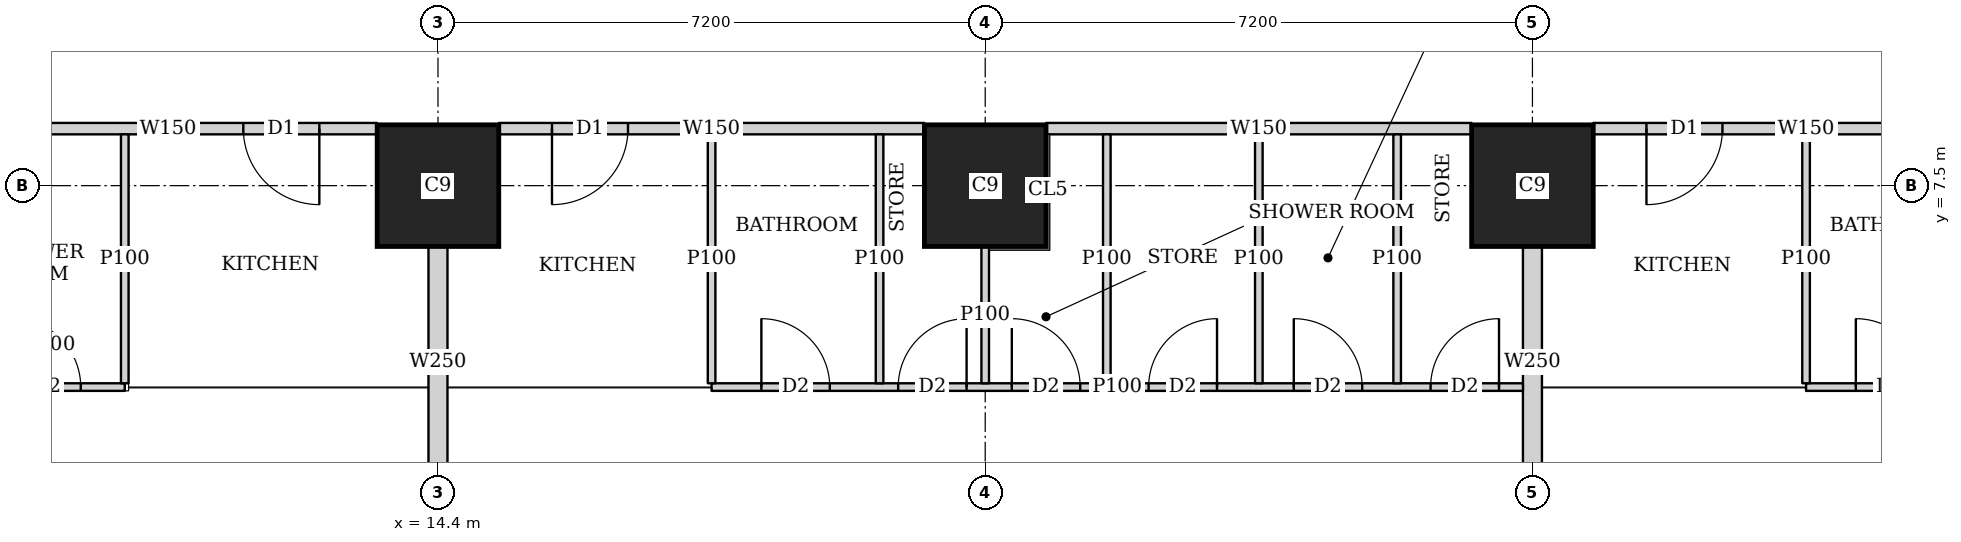
"""IFC4 building model, lengths in metres.
Left out: names, types, materials, properties, quantities, classifications, styles, units other than length and angle.
Written with IfcOpenShell. Run it as: python <this file> out.ifc"""

import sys

from ifc_helpers import new_model, si_unit, direction, frame, frame_2d, origin, origin_2d, place, context, subcontext, project, spatial, rectangle, extrude, element, fill, save


model = new_model("IFC4")
c1 = context("Model", 3, precision=1e-05, world=origin(), true_north=direction((0.0, 1.0)))
c2 = subcontext(c1, "Body", "Model", "MODEL_VIEW")
j1 = project(units=[si_unit("LENGTHUNIT", "METRE"), si_unit("PLANEANGLEUNIT", "RADIAN")], contexts=[c1])
p1 = place(None, origin())
s1 = spatial("IfcSite", under=j1, at=p1, CompositionType="ELEMENT")
p2 = place(p1, origin())
s2 = spatial("IfcBuilding", under=s1, at=p2, CompositionType="ELEMENT")
p3 = place(p2, frame((0.0, 0.0, 81.65)))
s3 = spatial("IfcBuildingStorey", under=s2, at=p3, CompositionType="ELEMENT", Elevation=81.65)
for number, where, z_axis, x_axis in (
    (1, (14.4, 7.5, 0.0), (0.0, 0.0, 1.0), (1.0, 0.0, 0.0)),
    (2, (21.6, 7.5, 0.0), (0.0, 0.0, 1.0), (1.0, 0.0, 0.0)),
    (3, (28.8, 7.5, 0.0), (0.0, 0.0, 1.0), (1.0, 0.0, 0.0)),
):
    element("IfcColumn", number, at=place(p3, frame(where, z_axis=z_axis, x_axis=x_axis)), inside=s3, PredefinedType="COLUMN", context=c2, shape_type="SweptSolid", body=[
        extrude(rectangle(XDim=1.6, YDim=1.6, at=origin_2d()), origin(), (0.0, 0.0, 1.0), 3.75),
    ])
p4 = place(p3, frame((35.199, 8.25, 0.0), z_axis=(0.0, 0.0, 1.0), x_axis=(-1.0, 0.0, 0.0)))
e4 = element("IfcWall", 4, at=p4, inside=s3, PredefinedType="SOLIDWALL", context=c2, shape_type="SweptSolid", body=[
    extrude(rectangle(XDim=5.598, YDim=0.15, at=frame_2d((2.799, 0.0))), origin(), (0.0, 0.0, 1.0), 3.5),
])
p5 = place(p4, frame((3.899, 0.0, 0.0)))
e5 = element("IfcOpeningElement", 5, at=p5, cuts=e4, PredefinedType="OPENING", context=c2, shape_type="SweptSolid", body=[
    extrude(rectangle(XDim=1.0, YDim=2.1, at=frame_2d((0.5, 1.05))), frame((0.0, 0.085, 0.0), z_axis=(0.0, -1.0, 0.0), x_axis=(1.0, 0.0, 0.0)), (0.0, 0.0, 1.0), 0.17),
])
p6 = place(p3, frame((27.999, 8.25, 0.0), z_axis=(0.0, 0.0, 1.0), x_axis=(-1.0, 0.0, 0.0)))
e6 = element("IfcWall", 6, at=p6, inside=s3, PredefinedType="SOLIDWALL", context=c2, shape_type="SweptSolid", body=[
    extrude(rectangle(XDim=5.598, YDim=0.15, at=frame_2d((2.799, 0.0))), origin(), (0.0, 0.0, 1.0), 3.5),
])
p7 = place(p3, frame((20.799, 8.25, 0.0), z_axis=(0.0, 0.0, 1.0), x_axis=(-1.0, 0.0, 0.0)))
e7 = element("IfcWall", 7, at=p7, inside=s3, PredefinedType="SOLIDWALL", context=c2, shape_type="SweptSolid", body=[
    extrude(rectangle(XDim=5.598, YDim=0.15, at=frame_2d((2.799, 0.0))), origin(), (0.0, 0.0, 1.0), 3.5),
])
p8 = place(p7, frame((3.899, 0.0, 0.0)))
e8 = element("IfcOpeningElement", 8, at=p8, cuts=e7, PredefinedType="OPENING", context=c2, shape_type="SweptSolid", body=[
    extrude(rectangle(XDim=1.0, YDim=2.1, at=frame_2d((0.5, 1.05))), frame((0.0, 0.085, 0.0), z_axis=(0.0, -1.0, 0.0), x_axis=(1.0, 0.0, 0.0)), (0.0, 0.0, 1.0), 0.17),
])
p9 = place(p3, frame((13.599, 8.25, 0.0), z_axis=(0.0, 0.0, 1.0), x_axis=(-1.0, 0.0, 0.0)))
e9 = element("IfcWall", 9, at=p9, inside=s3, PredefinedType="SOLIDWALL", context=c2, shape_type="SweptSolid", body=[
    extrude(rectangle(XDim=5.499, YDim=0.15, at=frame_2d((2.75, 0.0))), origin(), (0.0, 0.0, 1.0), 3.5),
])
p10 = place(p9, frame((0.76, 0.0, 0.0)))
e10 = element("IfcOpeningElement", 10, at=p10, cuts=e9, PredefinedType="OPENING", context=c2, shape_type="SweptSolid", body=[
    extrude(rectangle(XDim=1.0, YDim=2.1, at=frame_2d((0.5, 1.05))), frame((0.0, 0.085, 0.0), z_axis=(0.0, -1.0, 0.0), x_axis=(1.0, 0.0, 0.0)), (0.0, 0.0, 1.0), 0.17),
])
p11 = place(p3, frame((33.382, 45.65, 0.0), z_axis=(0.0, 0.0, 1.0), x_axis=(0.185593544777, -0.982626600565, 0.0)))
e11 = element("IfcWall", 11, at=p11, inside=s3, PredefinedType="SOLIDWALL", context=c2, shape_type="SweptSolid", body=[
    extrude(rectangle(XDim=47.118, YDim=0.15, at=frame_2d((23.559, 0.0))), origin(), (0.0, 0.0, 1.0), 2.2),
])
p12 = place(p11, frame((19.054, 0.0, 0.0)))
e12 = element("IfcOpeningElement", 12, at=p12, cuts=e11, PredefinedType="OPENING", context=c2, shape_type="SweptSolid", body=[
    extrude(rectangle(XDim=1.0, YDim=2.1, at=frame_2d((0.5, 1.05))), frame((0.0, 0.085, 0.0), z_axis=(0.0, -1.0, 0.0), x_axis=(1.0, 0.0, 0.0)), (0.0, 0.0, 1.0), 0.17),
])
p13 = place(p11, frame((22.87, 0.0, 0.0)))
e13 = element("IfcOpeningElement", 13, at=p13, cuts=e11, PredefinedType="OPENING", context=c2, shape_type="SweptSolid", body=[
    extrude(rectangle(XDim=1.0, YDim=2.1, at=frame_2d((0.5, 1.05))), frame((0.0, 0.085, 0.0), z_axis=(0.0, -1.0, 0.0), x_axis=(1.0, 0.0, 0.0)), (0.0, 0.0, 1.0), 0.17),
])
p14 = place(p11, frame((33.833, 0.0, 0.0)))
e14 = element("IfcOpeningElement", 14, at=p14, cuts=e11, PredefinedType="OPENING", context=c2, shape_type="SweptSolid", body=[
    extrude(rectangle(XDim=1.0, YDim=2.1, at=frame_2d((0.5, 1.05))), frame((0.0, 0.085, 0.0), z_axis=(0.0, -1.0, 0.0), x_axis=(1.0, 0.0, 0.0)), (0.0, 0.0, 1.0), 0.17),
])
p15 = place(p3, frame((10.279, 4.85, 0.0), z_axis=(0.0, 0.0, 1.0), x_axis=(-1.0, 0.0, 0.0)))
e15 = element("IfcWall", 15, at=p15, inside=s3, PredefinedType="PARTITIONING", context=c2, shape_type="SweptSolid", body=[
    extrude(rectangle(XDim=1.954, YDim=0.1, at=frame_2d((0.977, 0.0))), origin(), (0.0, 0.0, 1.0), 3.5),
])
p16 = place(p15, frame((0.579, 0.0, 0.0)))
e16 = element("IfcOpeningElement", 16, at=p16, cuts=e15, PredefinedType="OPENING", context=c2, shape_type="SweptSolid", body=[
    extrude(rectangle(XDim=0.9, YDim=2.1, at=frame_2d((0.45, 1.05))), frame((0.0, 0.06, 0.0), z_axis=(0.0, -1.0, 0.0), x_axis=(1.0, 0.0, 0.0)), (0.0, 0.0, 1.0), 0.12),
])
p17 = place(p3, frame((10.279, 4.9, 0.0), z_axis=(0.0, 0.0, 1.0), x_axis=(0.0, 1.0, 0.0)))
e17 = element("IfcWall", 17, at=p17, inside=s3, PredefinedType="PARTITIONING", context=c2, shape_type="SweptSolid", body=[
    extrude(rectangle(XDim=3.275, YDim=0.1, at=frame_2d((1.638, 0.0))), origin(), (0.0, 0.0, 1.0), 3.5),
])
p18 = place(p3, frame((28.675, 4.85, 0.0), z_axis=(0.0, 0.0, 1.0), x_axis=(-1.0, 0.0, 0.0)))
e18 = element("IfcWall", 18, at=p18, inside=s3, PredefinedType="PARTITIONING", context=c2, shape_type="SweptSolid", body=[
    extrude(rectangle(XDim=10.675, YDim=0.1, at=frame_2d((5.337, 0.0))), origin(), (0.0, 0.0, 1.0), 3.5),
])
p19 = place(p18, frame((9.12, 0.0, 0.0)))
e19 = element("IfcOpeningElement", 19, at=p19, cuts=e18, PredefinedType="OPENING", context=c2, shape_type="SweptSolid", body=[
    extrude(rectangle(XDim=0.9, YDim=2.1, at=frame_2d((0.45, 1.05))), frame((0.0, 0.06, 0.0), z_axis=(0.0, -1.0, 0.0), x_axis=(1.0, 0.0, 0.0)), (0.0, 0.0, 1.0), 0.12),
])
p20 = place(p18, frame((5.825, 0.0, 0.0)))
e20 = element("IfcOpeningElement", 20, at=p20, cuts=e18, PredefinedType="OPENING", context=c2, shape_type="SweptSolid", body=[
    extrude(rectangle(XDim=0.9, YDim=2.1, at=frame_2d((0.45, 1.05))), frame((0.0, 0.06, 0.0), z_axis=(0.0, -1.0, 0.0), x_axis=(1.0, 0.0, 0.0)), (0.0, 0.0, 1.0), 0.12),
])
p21 = place(p18, frame((2.115, 0.0, 0.0)))
e21 = element("IfcOpeningElement", 21, at=p21, cuts=e18, PredefinedType="OPENING", context=c2, shape_type="SweptSolid", body=[
    extrude(rectangle(XDim=0.9, YDim=2.1, at=frame_2d((0.45, 1.05))), frame((0.0, 0.06, 0.0), z_axis=(0.0, -1.0, 0.0), x_axis=(1.0, 0.0, 0.0)), (0.0, 0.0, 1.0), 0.12),
])
p22 = place(p18, frame((7.32, 0.0, 0.0)))
e22 = element("IfcOpeningElement", 22, at=p22, cuts=e18, PredefinedType="OPENING", context=c2, shape_type="SweptSolid", body=[
    extrude(rectangle(XDim=0.9, YDim=2.1, at=frame_2d((0.45, 1.05))), frame((0.0, 0.06, 0.0), z_axis=(0.0, -1.0, 0.0), x_axis=(1.0, 0.0, 0.0)), (0.0, 0.0, 1.0), 0.12),
])
p23 = place(p18, frame((4.025, 0.0, 0.0)))
e23 = element("IfcOpeningElement", 23, at=p23, cuts=e18, PredefinedType="OPENING", context=c2, shape_type="SweptSolid", body=[
    extrude(rectangle(XDim=0.9, YDim=2.1, at=frame_2d((0.45, 1.05))), frame((0.0, 0.06, 0.0), z_axis=(0.0, -1.0, 0.0), x_axis=(1.0, 0.0, 0.0)), (0.0, 0.0, 1.0), 0.12),
])
p24 = place(p18, frame((0.315, 0.0, 0.0)))
e24 = element("IfcOpeningElement", 24, at=p24, cuts=e18, PredefinedType="OPENING", context=c2, shape_type="SweptSolid", body=[
    extrude(rectangle(XDim=0.9, YDim=2.1, at=frame_2d((0.45, 1.05))), frame((0.0, 0.06, 0.0), z_axis=(0.0, -1.0, 0.0), x_axis=(1.0, 0.0, 0.0)), (0.0, 0.0, 1.0), 0.12),
])
p25 = place(p3, frame((18.0, 4.9, 0.0), z_axis=(0.0, 0.0, 1.0), x_axis=(0.0, 1.0, 0.0)))
e25 = element("IfcWall", 25, at=p25, inside=s3, PredefinedType="PARTITIONING", context=c2, shape_type="SweptSolid", body=[
    extrude(rectangle(XDim=3.275, YDim=0.1, at=frame_2d((1.638, 0.0))), origin(), (0.0, 0.0, 1.0), 3.5),
])
p26 = place(p3, frame((21.6, 4.9, 0.0), z_axis=(0.0, 0.0, 1.0), x_axis=(0.0, 1.0, 0.0)))
e26 = element("IfcWall", 26, at=p26, inside=s3, PredefinedType="PARTITIONING", context=c2, shape_type="SweptSolid", body=[
    extrude(rectangle(XDim=1.799, YDim=0.1, at=frame_2d((0.899, 0.0))), origin(), (0.0, 0.0, 1.0), 3.5),
])
for number, where, z_axis, x_axis in (
    (27, (25.2, 4.9, 0.0), (0.0, 0.0, 1.0), (0.0, 1.0, 0.0)),
    (28, (20.21, 4.9, 0.0), (0.0, 0.0, 1.0), (0.0, 1.0, 0.0)),
    (29, (23.2, 4.9, 0.0), (0.0, 0.0, 1.0), (0.0, 1.0, 0.0)),
    (30, (27.02, 4.9, 0.0), (0.0, 0.0, 1.0), (0.0, 1.0, 0.0)),
):
    element("IfcWall", number, at=place(p3, frame(where, z_axis=z_axis, x_axis=x_axis)), inside=s3, PredefinedType="PARTITIONING", context=c2, shape_type="SweptSolid", body=[
        extrude(rectangle(XDim=3.275, YDim=0.1, at=frame_2d((1.638, 0.0))), origin(), (0.0, 0.0, 1.0), 3.5),
    ])
p27 = place(p3, frame((14.4, 3.65, 0.0), z_axis=(0.0, 0.0, 1.0), x_axis=(0.0, 1.0, 0.0)))
e31 = element("IfcWall", 31, at=p27, inside=s3, PredefinedType="SOLIDWALL", context=c2, shape_type="SweptSolid", body=[
    extrude(rectangle(XDim=3.049, YDim=0.25, at=frame_2d((1.524, 0.0))), origin(), (0.0, 0.0, 1.0), 3.5),
])
p28 = place(p3, frame((41.002, 4.85, 0.0), z_axis=(0.0, 0.0, 1.0), x_axis=(-1.0, 0.0, 0.0)))
e32 = element("IfcWall", 32, at=p28, inside=s3, PredefinedType="PARTITIONING", context=c2, shape_type="SweptSolid", body=[
    extrude(rectangle(XDim=8.602, YDim=0.1, at=frame_2d((4.301, 0.0))), origin(), (0.0, 0.0, 1.0), 3.5),
])
p29 = place(p28, frame((7.047, 0.0, 0.0)))
e33 = element("IfcOpeningElement", 33, at=p29, cuts=e32, PredefinedType="OPENING", context=c2, shape_type="SweptSolid", body=[
    extrude(rectangle(XDim=0.9, YDim=2.1, at=frame_2d((0.45, 1.05))), frame((0.0, 0.06, 0.0), z_axis=(0.0, -1.0, 0.0), x_axis=(1.0, 0.0, 0.0)), (0.0, 0.0, 1.0), 0.12),
])
p30 = place(p28, frame((3.752, 0.0, 0.0)))
e34 = element("IfcOpeningElement", 34, at=p30, cuts=e32, PredefinedType="OPENING", context=c2, shape_type="SweptSolid", body=[
    extrude(rectangle(XDim=0.9, YDim=2.1, at=frame_2d((0.45, 1.05))), frame((0.0, 0.06, 0.0), z_axis=(0.0, -1.0, 0.0), x_axis=(1.0, 0.0, 0.0)), (0.0, 0.0, 1.0), 0.12),
])
p31 = place(p28, frame((0.15, 0.0, 0.0)))
e35 = element("IfcOpeningElement", 35, at=p31, cuts=e32, PredefinedType="OPENING", context=c2, shape_type="SweptSolid", body=[
    extrude(rectangle(XDim=0.9, YDim=2.1, at=frame_2d((0.45, 1.05))), frame((0.0, 0.06, 0.0), z_axis=(0.0, -1.0, 0.0), x_axis=(1.0, 0.0, 0.0)), (0.0, 0.0, 1.0), 0.12),
])
p32 = place(p28, frame((5.247, 0.0, 0.0)))
e36 = element("IfcOpeningElement", 36, at=p32, cuts=e32, PredefinedType="OPENING", context=c2, shape_type="SweptSolid", body=[
    extrude(rectangle(XDim=0.9, YDim=2.1, at=frame_2d((0.45, 1.05))), frame((0.0, 0.06, 0.0), z_axis=(0.0, -1.0, 0.0), x_axis=(1.0, 0.0, 0.0)), (0.0, 0.0, 1.0), 0.12),
])
p33 = place(p28, frame((1.952, 0.0, 0.0)))
e37 = element("IfcOpeningElement", 37, at=p33, cuts=e32, PredefinedType="OPENING", context=c2, shape_type="SweptSolid", body=[
    extrude(rectangle(XDim=0.9, YDim=2.1, at=frame_2d((0.45, 1.05))), frame((0.0, 0.06, 0.0), z_axis=(0.0, -1.0, 0.0), x_axis=(1.0, 0.0, 0.0)), (0.0, 0.0, 1.0), 0.12),
])
p34 = place(p3, frame((32.4, 4.9, 0.0), z_axis=(0.0, 0.0, 1.0), x_axis=(0.0, 1.0, 0.0)))
e38 = element("IfcWall", 38, at=p34, inside=s3, PredefinedType="PARTITIONING", context=c2, shape_type="SweptSolid", body=[
    extrude(rectangle(XDim=3.275, YDim=0.1, at=frame_2d((1.638, 0.0))), origin(), (0.0, 0.0, 1.0), 3.5),
])
p35 = place(p3, frame((28.8, 3.65, 0.0), z_axis=(0.0, 0.0, 1.0), x_axis=(0.0, 1.0, 0.0)))
e39 = element("IfcWall", 39, at=p35, inside=s3, PredefinedType="SOLIDWALL", context=c2, shape_type="SweptSolid", body=[
    extrude(rectangle(XDim=3.049, YDim=0.25, at=frame_2d((1.524, 0.0))), origin(), (0.0, 0.0, 1.0), 3.5),
])
p36 = place(p16, origin())
e40 = element("IfcDoor", 40, at=p36, inside=s3, OperationType="SINGLE_SWING_LEFT", PredefinedType="DOOR", context=c2, shape_type="SweptSolid", body=[
    extrude(rectangle(XDim=0.9, YDim=2.1, at=frame_2d((0.45, 1.05))), frame((0.0, 0.025, 0.0), z_axis=(0.0, -1.0, 0.0), x_axis=(1.0, 0.0, 0.0)), (0.0, 0.0, 1.0), 0.05),
])
fill(e16, e40)
p37 = place(p10, origin())
e41 = element("IfcDoor", 41, at=p37, inside=s3, OperationType="SINGLE_SWING_LEFT", PredefinedType="DOOR", context=c2, shape_type="SweptSolid", body=[
    extrude(rectangle(XDim=1.0, YDim=2.1, at=frame_2d((0.5, 1.05))), frame((0.0, 0.025, 0.0), z_axis=(0.0, -1.0, 0.0), x_axis=(1.0, 0.0, 0.0)), (0.0, 0.0, 1.0), 0.05),
])
fill(e10, e41)
p38 = place(p19, origin())
e42 = element("IfcDoor", 42, at=p38, inside=s3, OperationType="SINGLE_SWING_LEFT", PredefinedType="DOOR", context=c2, shape_type="SweptSolid", body=[
    extrude(rectangle(XDim=0.9, YDim=2.1, at=frame_2d((0.45, 1.05))), frame((0.0, 0.025, 0.0), z_axis=(0.0, -1.0, 0.0), x_axis=(1.0, 0.0, 0.0)), (0.0, 0.0, 1.0), 0.05),
])
fill(e19, e42)
p39 = place(p20, origin())
e43 = element("IfcDoor", 43, at=p39, inside=s3, OperationType="SINGLE_SWING_LEFT", PredefinedType="DOOR", context=c2, shape_type="SweptSolid", body=[
    extrude(rectangle(XDim=0.9, YDim=2.1, at=frame_2d((0.45, 1.05))), frame((0.0, 0.025, 0.0), z_axis=(0.0, -1.0, 0.0), x_axis=(1.0, 0.0, 0.0)), (0.0, 0.0, 1.0), 0.05),
])
fill(e20, e43)
p40 = place(p21, origin())
e44 = element("IfcDoor", 44, at=p40, inside=s3, OperationType="SINGLE_SWING_LEFT", PredefinedType="DOOR", context=c2, shape_type="SweptSolid", body=[
    extrude(rectangle(XDim=0.9, YDim=2.1, at=frame_2d((0.45, 1.05))), frame((0.0, 0.025, 0.0), z_axis=(0.0, -1.0, 0.0), x_axis=(1.0, 0.0, 0.0)), (0.0, 0.0, 1.0), 0.05),
])
fill(e21, e44)
p41 = place(p22, origin())
e45 = element("IfcDoor", 45, at=p41, inside=s3, OperationType="SINGLE_SWING_RIGHT", PredefinedType="DOOR", context=c2, shape_type="SweptSolid", body=[
    extrude(rectangle(XDim=0.9, YDim=2.1, at=frame_2d((0.45, 1.05))), frame((0.0, 0.025, 0.0), z_axis=(0.0, -1.0, 0.0), x_axis=(1.0, 0.0, 0.0)), (0.0, 0.0, 1.0), 0.05),
])
fill(e22, e45)
p42 = place(p23, origin())
e46 = element("IfcDoor", 46, at=p42, inside=s3, OperationType="SINGLE_SWING_RIGHT", PredefinedType="DOOR", context=c2, shape_type="SweptSolid", body=[
    extrude(rectangle(XDim=0.9, YDim=2.1, at=frame_2d((0.45, 1.05))), frame((0.0, 0.025, 0.0), z_axis=(0.0, -1.0, 0.0), x_axis=(1.0, 0.0, 0.0)), (0.0, 0.0, 1.0), 0.05),
])
fill(e23, e46)
p43 = place(p24, origin())
e47 = element("IfcDoor", 47, at=p43, inside=s3, OperationType="SINGLE_SWING_RIGHT", PredefinedType="DOOR", context=c2, shape_type="SweptSolid", body=[
    extrude(rectangle(XDim=0.9, YDim=2.1, at=frame_2d((0.45, 1.05))), frame((0.0, 0.025, 0.0), z_axis=(0.0, -1.0, 0.0), x_axis=(1.0, 0.0, 0.0)), (0.0, 0.0, 1.0), 0.05),
])
fill(e24, e47)
p44 = place(p8, origin())
e48 = element("IfcDoor", 48, at=p44, inside=s3, OperationType="SINGLE_SWING_RIGHT", PredefinedType="DOOR", context=c2, shape_type="SweptSolid", body=[
    extrude(rectangle(XDim=1.0, YDim=2.1, at=frame_2d((0.5, 1.05))), frame((0.0, 0.025, 0.0), z_axis=(0.0, -1.0, 0.0), x_axis=(1.0, 0.0, 0.0)), (0.0, 0.0, 1.0), 0.05),
])
fill(e8, e48)
p45 = place(p29, origin())
e49 = element("IfcDoor", 49, at=p45, inside=s3, OperationType="SINGLE_SWING_LEFT", PredefinedType="DOOR", context=c2, shape_type="SweptSolid", body=[
    extrude(rectangle(XDim=0.9, YDim=2.1, at=frame_2d((0.45, 1.05))), frame((0.0, 0.025, 0.0), z_axis=(0.0, -1.0, 0.0), x_axis=(1.0, 0.0, 0.0)), (0.0, 0.0, 1.0), 0.05),
])
fill(e33, e49)
p46 = place(p5, origin())
e50 = element("IfcDoor", 50, at=p46, inside=s3, OperationType="SINGLE_SWING_RIGHT", PredefinedType="DOOR", context=c2, shape_type="SweptSolid", body=[
    extrude(rectangle(XDim=1.0, YDim=2.1, at=frame_2d((0.5, 1.05))), frame((0.0, 0.025, 0.0), z_axis=(0.0, -1.0, 0.0), x_axis=(1.0, 0.0, 0.0)), (0.0, 0.0, 1.0), 0.05),
])
fill(e5, e50)
save(model, sys.argv[1])
